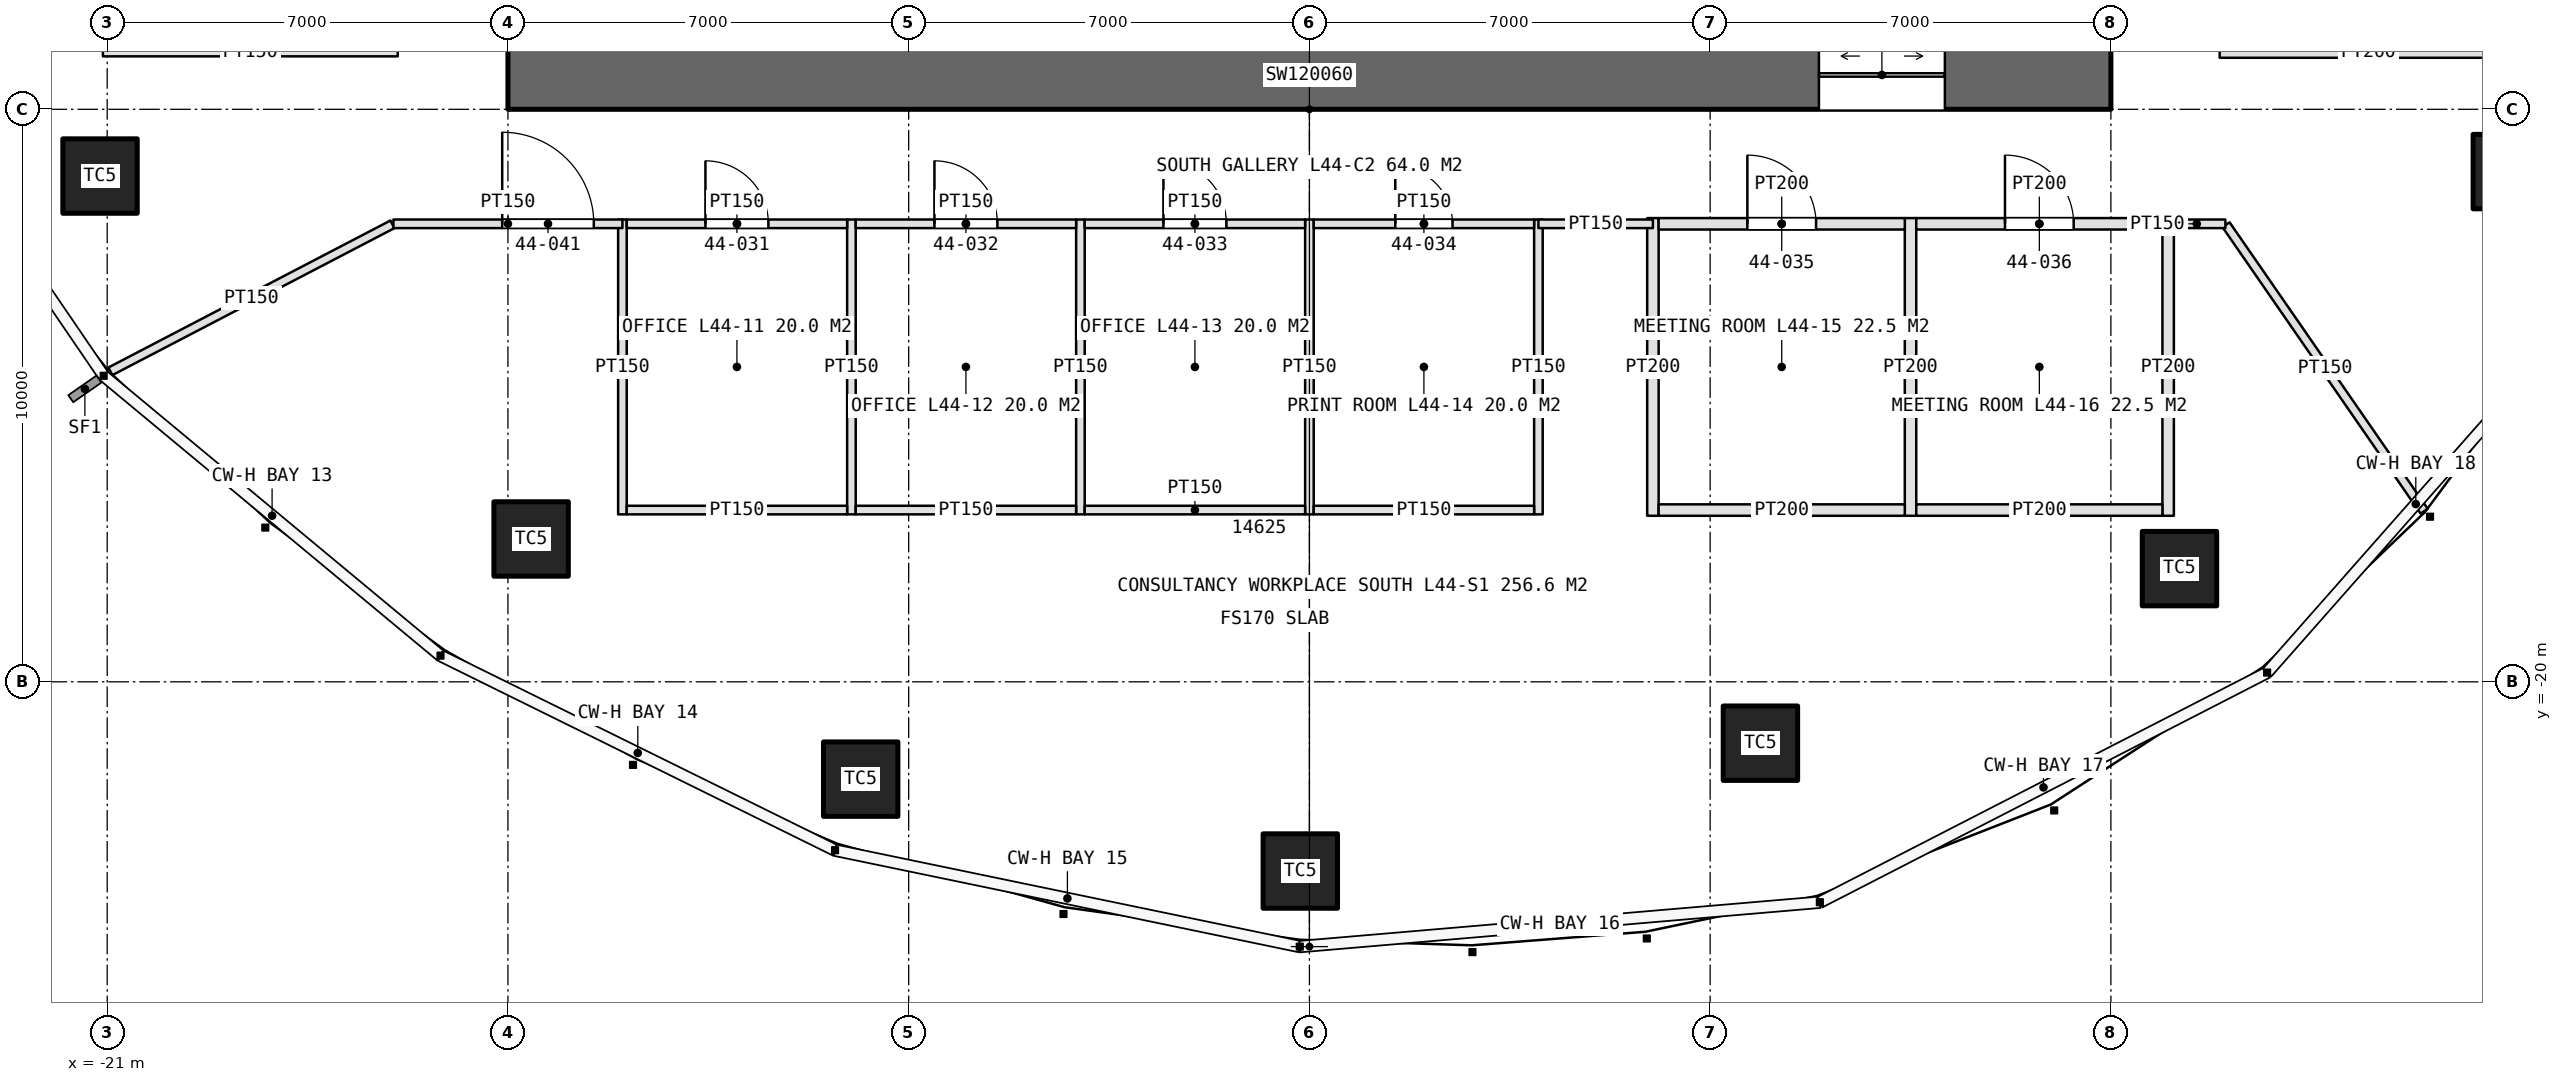
"""IFC4 building model, lengths in metres.
Left out: names, types, materials, properties, quantities, classifications, styles, units other than length and angle.
Written with IfcOpenShell. Run it as: python <this file> out.ifc"""

import sys

from ifc_helpers import new_model, si_unit, direction, frame, frame_2d, origin, origin_2d, place, context, subcontext, project, spatial, rectangle, extrude, element, fill, save


model = new_model("IFC4")
c1 = context("Model", 3, precision=1e-05, world=origin(), true_north=direction((0.0, 1.0)))
c2 = subcontext(c1, "Body", "Model", "MODEL_VIEW")
j1 = project(units=[si_unit("LENGTHUNIT", "METRE"), si_unit("PLANEANGLEUNIT", "RADIAN")], contexts=[c1])
p1 = place(None, origin())
s1 = spatial("IfcSite", under=j1, at=p1, CompositionType="ELEMENT")
p2 = place(p1, origin())
s2 = spatial("IfcBuilding", under=s1, at=p2, CompositionType="ELEMENT")
p3 = place(p2, frame((0.0, 0.0, 203.2)))
s3 = spatial("IfcBuildingStorey", under=s2, at=p3, CompositionType="ELEMENT", Elevation=203.2)
p4 = place(p3, frame((-14.0, -9.4, 0.0), z_axis=(0.0, 0.0, 1.0), x_axis=(1.0, 0.0, 0.0)))
e1 = element("IfcWall", 1, at=p4, inside=s3, PredefinedType="SHEAR", context=c2, shape_type="SweptSolid", body=[
    extrude(rectangle(XDim=28.0, YDim=1.2, at=frame_2d((14.0, 0.0))), origin(), (0.0, 0.0, 1.0), 4.2),
])
p5 = place(p4, frame((22.9, 0.0, 0.0)))
e2 = element("IfcOpeningElement", 2, at=p5, cuts=e1, PredefinedType="OPENING", context=c2, shape_type="SweptSolid", body=[
    extrude(rectangle(XDim=2.2, YDim=2.7, at=frame_2d((1.1, 1.35))), frame((0.0, 0.61, 0.0), z_axis=(0.0, -1.0, 0.0), x_axis=(1.0, 0.0, 0.0)), (0.0, 0.0, 1.0), 1.22),
])
for number, where, z_axis, x_axis in (
    (3, (-21.125, -11.166, 0.0), (0.0, 0.0, 1.0), (1.0, 0.0, 0.0)),
    (4, (-13.595, -17.505, 0.0), (0.0, 0.0, 1.0), (1.0, 0.0, 0.0)),
    (5, (-7.838, -21.7, 0.0), (0.0, 0.0, 1.0), (1.0, 0.0, 0.0)),
    (6, (-0.159, -23.305, 0.0), (0.0, 0.0, 1.0), (1.0, 0.0, 0.0)),
    (7, (7.878, -21.072, 0.0), (0.0, 0.0, 1.0), (1.0, 0.0, 0.0)),
    (8, (15.198, -18.023, 0.0), (0.0, 0.0, 1.0), (1.0, 0.0, 0.0)),
    (9, (20.977, -11.088, 0.0), (0.0, 0.0, 1.0), (1.0, 0.0, 0.0)),
):
    element("IfcColumn", number, at=place(p3, frame(where, z_axis=z_axis, x_axis=x_axis)), inside=s3, PredefinedType="COLUMN", context=c2, shape_type="SweptSolid", body=[
        extrude(rectangle(XDim=1.3, YDim=1.3, at=origin_2d()), origin(), (0.0, 0.0, 1.0), 4.2),
    ])
p6 = place(p3, frame((15.9, -9.0, 0.0), z_axis=(0.0, 0.0, 1.0), x_axis=(1.0, 0.0, 0.0)))
e10 = element("IfcWall", 10, at=p6, inside=s3, PredefinedType="PARTITIONING", context=c2, shape_type="SweptSolid", body=[
    extrude(rectangle(XDim=5.2, YDim=0.2, at=frame_2d((2.6, 0.0))), origin(), (0.0, 0.0, 1.0), 3.0),
])
for number, where, z_axis, x_axis in (
    (11, (-12.0, -11.925, 0.0), (0.0, 0.0, 1.0), (0.0, -1.0, 0.0)),
    (12, (-8.0, -11.925, 0.0), (0.0, 0.0, 1.0), (0.0, -1.0, 0.0)),
    (13, (-4.0, -11.925, 0.0), (0.0, 0.0, 1.0), (0.0, -1.0, 0.0)),
    (14, (0.0, -11.925, 0.0), (0.0, 0.0, 1.0), (0.0, -1.0, 0.0)),
    (15, (4.0, -11.925, 0.0), (0.0, 0.0, 1.0), (0.0, -1.0, 0.0)),
):
    element("IfcWall", number, at=place(p3, frame(where, z_axis=z_axis, x_axis=x_axis)), inside=s3, PredefinedType="PARTITIONING", context=c2, shape_type="SweptSolid", body=[
        extrude(rectangle(XDim=5.15, YDim=0.15, at=frame_2d((2.575, 0.0))), origin(), (0.0, 0.0, 1.0), 3.0),
    ])
p7 = place(p3, frame((-11.925, -12.0, 0.0), z_axis=(0.0, 0.0, 1.0), x_axis=(1.0, 0.0, 0.0)))
e16 = element("IfcWall", 16, at=p7, inside=s3, PredefinedType="PARTITIONING", context=c2, shape_type="SweptSolid", body=[
    extrude(rectangle(XDim=3.85, YDim=0.15, at=frame_2d((1.925, 0.0))), origin(), (0.0, 0.0, 1.0), 3.0),
])
p8 = place(p7, frame((1.375, 0.0, 0.0)))
e17 = element("IfcOpeningElement", 17, at=p8, cuts=e16, PredefinedType="OPENING", context=c2, shape_type="SweptSolid", body=[
    extrude(rectangle(XDim=1.1, YDim=2.3, at=frame_2d((0.55, 1.15))), frame((0.0, 0.085, 0.0), z_axis=(0.0, -1.0, 0.0), x_axis=(1.0, 0.0, 0.0)), (0.0, 0.0, 1.0), 0.17),
])
p9 = place(p3, frame((-11.925, -17.0, 0.0), z_axis=(0.0, 0.0, 1.0), x_axis=(1.0, 0.0, 0.0)))
e18 = element("IfcWall", 18, at=p9, inside=s3, PredefinedType="PARTITIONING", context=c2, shape_type="SweptSolid", body=[
    extrude(rectangle(XDim=3.85, YDim=0.15, at=frame_2d((1.925, 0.0))), origin(), (0.0, 0.0, 1.0), 3.0),
])
p10 = place(p3, frame((-7.925, -12.0, 0.0), z_axis=(0.0, 0.0, 1.0), x_axis=(1.0, 0.0, 0.0)))
e19 = element("IfcWall", 19, at=p10, inside=s3, PredefinedType="PARTITIONING", context=c2, shape_type="SweptSolid", body=[
    extrude(rectangle(XDim=3.85, YDim=0.15, at=frame_2d((1.925, 0.0))), origin(), (0.0, 0.0, 1.0), 3.0),
])
p11 = place(p10, frame((1.375, 0.0, 0.0)))
e20 = element("IfcOpeningElement", 20, at=p11, cuts=e19, PredefinedType="OPENING", context=c2, shape_type="SweptSolid", body=[
    extrude(rectangle(XDim=1.1, YDim=2.3, at=frame_2d((0.55, 1.15))), frame((0.0, 0.085, 0.0), z_axis=(0.0, -1.0, 0.0), x_axis=(1.0, 0.0, 0.0)), (0.0, 0.0, 1.0), 0.17),
])
p12 = place(p3, frame((-7.925, -17.0, 0.0), z_axis=(0.0, 0.0, 1.0), x_axis=(1.0, 0.0, 0.0)))
e21 = element("IfcWall", 21, at=p12, inside=s3, PredefinedType="PARTITIONING", context=c2, shape_type="SweptSolid", body=[
    extrude(rectangle(XDim=3.85, YDim=0.15, at=frame_2d((1.925, 0.0))), origin(), (0.0, 0.0, 1.0), 3.0),
])
p13 = place(p3, frame((-3.925, -12.0, 0.0), z_axis=(0.0, 0.0, 1.0), x_axis=(1.0, 0.0, 0.0)))
e22 = element("IfcWall", 22, at=p13, inside=s3, PredefinedType="PARTITIONING", context=c2, shape_type="SweptSolid", body=[
    extrude(rectangle(XDim=3.85, YDim=0.15, at=frame_2d((1.925, 0.0))), origin(), (0.0, 0.0, 1.0), 3.0),
])
p14 = place(p13, frame((1.375, 0.0, 0.0)))
e23 = element("IfcOpeningElement", 23, at=p14, cuts=e22, PredefinedType="OPENING", context=c2, shape_type="SweptSolid", body=[
    extrude(rectangle(XDim=1.1, YDim=2.3, at=frame_2d((0.55, 1.15))), frame((0.0, 0.085, 0.0), z_axis=(0.0, -1.0, 0.0), x_axis=(1.0, 0.0, 0.0)), (0.0, 0.0, 1.0), 0.17),
])
p15 = place(p3, frame((-3.925, -17.0, 0.0), z_axis=(0.0, 0.0, 1.0), x_axis=(1.0, 0.0, 0.0)))
e24 = element("IfcWall", 24, at=p15, inside=s3, PredefinedType="PARTITIONING", context=c2, shape_type="SweptSolid", body=[
    extrude(rectangle(XDim=3.85, YDim=0.15, at=frame_2d((1.925, 0.0))), origin(), (0.0, 0.0, 1.0), 3.0),
])
p16 = place(p3, frame((0.075, -12.0, 0.0), z_axis=(0.0, 0.0, 1.0), x_axis=(1.0, 0.0, 0.0)))
e25 = element("IfcWall", 25, at=p16, inside=s3, PredefinedType="PARTITIONING", context=c2, shape_type="SweptSolid", body=[
    extrude(rectangle(XDim=3.85, YDim=0.15, at=frame_2d((1.925, 0.0))), origin(), (0.0, 0.0, 1.0), 3.0),
])
p17 = place(p16, frame((1.425, 0.0, 0.0)))
e26 = element("IfcOpeningElement", 26, at=p17, cuts=e25, PredefinedType="OPENING", context=c2, shape_type="SweptSolid", body=[
    extrude(rectangle(XDim=1.0, YDim=2.2, at=frame_2d((0.5, 1.1))), frame((0.0, 0.085, 0.0), z_axis=(0.0, -1.0, 0.0), x_axis=(1.0, 0.0, 0.0)), (0.0, 0.0, 1.0), 0.17),
])
p18 = place(p3, frame((0.075, -17.0, 0.0), z_axis=(0.0, 0.0, 1.0), x_axis=(1.0, 0.0, 0.0)))
e27 = element("IfcWall", 27, at=p18, inside=s3, PredefinedType="PARTITIONING", context=c2, shape_type="SweptSolid", body=[
    extrude(rectangle(XDim=3.85, YDim=0.15, at=frame_2d((1.925, 0.0))), origin(), (0.0, 0.0, 1.0), 3.0),
])
for number, where, z_axis, x_axis in (
    (28, (6.0, -11.9, 0.0), (0.0, 0.0, 1.0), (0.0, -1.0, 0.0)),
    (29, (10.5, -11.9, 0.0), (0.0, 0.0, 1.0), (0.0, -1.0, 0.0)),
    (30, (15.0, -11.9, 0.0), (0.0, 0.0, 1.0), (0.0, -1.0, 0.0)),
):
    element("IfcWall", number, at=place(p3, frame(where, z_axis=z_axis, x_axis=x_axis)), inside=s3, PredefinedType="PARTITIONING", context=c2, shape_type="SweptSolid", body=[
        extrude(rectangle(XDim=5.2, YDim=0.2, at=frame_2d((2.6, 0.0))), origin(), (0.0, 0.0, 1.0), 3.0),
    ])
p19 = place(p3, frame((6.1, -12.0, 0.0), z_axis=(0.0, 0.0, 1.0), x_axis=(1.0, 0.0, 0.0)))
e31 = element("IfcWall", 31, at=p19, inside=s3, PredefinedType="PARTITIONING", context=c2, shape_type="SweptSolid", body=[
    extrude(rectangle(XDim=4.3, YDim=0.2, at=frame_2d((2.15, 0.0))), origin(), (0.0, 0.0, 1.0), 3.0),
])
p20 = place(p19, frame((1.55, 0.0, 0.0)))
e32 = element("IfcOpeningElement", 32, at=p20, cuts=e31, PredefinedType="OPENING", context=c2, shape_type="SweptSolid", body=[
    extrude(rectangle(XDim=1.2, YDim=2.4, at=frame_2d((0.6, 1.2))), frame((0.0, 0.11, 0.0), z_axis=(0.0, -1.0, 0.0), x_axis=(1.0, 0.0, 0.0)), (0.0, 0.0, 1.0), 0.22),
])
p21 = place(p3, frame((6.1, -17.0, 0.0), z_axis=(0.0, 0.0, 1.0), x_axis=(1.0, 0.0, 0.0)))
e33 = element("IfcWall", 33, at=p21, inside=s3, PredefinedType="PARTITIONING", context=c2, shape_type="SweptSolid", body=[
    extrude(rectangle(XDim=4.3, YDim=0.2, at=frame_2d((2.15, 0.0))), origin(), (0.0, 0.0, 1.0), 3.0),
])
p22 = place(p3, frame((10.6, -12.0, 0.0), z_axis=(0.0, 0.0, 1.0), x_axis=(1.0, 0.0, 0.0)))
e34 = element("IfcWall", 34, at=p22, inside=s3, PredefinedType="PARTITIONING", context=c2, shape_type="SweptSolid", body=[
    extrude(rectangle(XDim=4.3, YDim=0.2, at=frame_2d((2.15, 0.0))), origin(), (0.0, 0.0, 1.0), 3.0),
])
p23 = place(p22, frame((1.55, 0.0, 0.0)))
e35 = element("IfcOpeningElement", 35, at=p23, cuts=e34, PredefinedType="OPENING", context=c2, shape_type="SweptSolid", body=[
    extrude(rectangle(XDim=1.2, YDim=2.4, at=frame_2d((0.6, 1.2))), frame((0.0, 0.11, 0.0), z_axis=(0.0, -1.0, 0.0), x_axis=(1.0, 0.0, 0.0)), (0.0, 0.0, 1.0), 0.22),
])
p24 = place(p3, frame((10.6, -17.0, 0.0), z_axis=(0.0, 0.0, 1.0), x_axis=(1.0, 0.0, 0.0)))
e36 = element("IfcWall", 36, at=p24, inside=s3, PredefinedType="PARTITIONING", context=c2, shape_type="SweptSolid", body=[
    extrude(rectangle(XDim=4.3, YDim=0.2, at=frame_2d((2.15, 0.0))), origin(), (0.0, 0.0, 1.0), 3.0),
])
p25 = place(p3, frame((-15.925, -9.0, 0.0), z_axis=(0.0, 0.0, 1.0), x_axis=(-1.0, 0.0, 0.0)))
e37 = element("IfcWall", 37, at=p25, inside=s3, PredefinedType="PARTITIONING", context=c2, shape_type="SweptSolid", body=[
    extrude(rectangle(XDim=5.15, YDim=0.15, at=frame_2d((2.575, 0.0))), origin(), (0.0, 0.0, 1.0), 3.0),
])
p26 = place(p3, frame((-16.018, -12.009, 0.0), z_axis=(0.0, 0.0, 1.0), x_axis=(-0.886831549241, -0.462092851351, 0.0)))
e38 = element("IfcWall", 38, at=p26, inside=s3, PredefinedType="PARTITIONING", context=c2, shape_type="SweptSolid", body=[
    extrude(rectangle(XDim=5.555, YDim=0.15, at=frame_2d((2.778, 0.0))), origin(), (0.0, 0.0, 1.0), 3.0),
])
p27 = place(p3, frame((16.011, -12.016, 0.0), z_axis=(0.0, 0.0, 1.0), x_axis=(0.568863489071, -0.822431961199, 0.0)))
e39 = element("IfcWall", 39, at=p27, inside=s3, PredefinedType="PARTITIONING", context=c2, shape_type="SweptSolid", body=[
    extrude(rectangle(XDim=6.083, YDim=0.15, at=frame_2d((3.042, 0.0))), origin(), (0.0, 0.0, 1.0), 3.0),
])
p28 = place(p3, frame((-16.0, -12.0, 0.0), z_axis=(0.0, 0.0, 1.0), x_axis=(1.0, 0.0, 0.0)))
e40 = element("IfcWall", 40, at=p28, inside=s3, PredefinedType="PARTITIONING", context=c2, shape_type="SweptSolid", body=[
    extrude(rectangle(XDim=4.0, YDim=0.15, at=frame_2d((2.0, 0.0))), origin(), (0.0, 0.0, 1.0), 3.0),
])
p29 = place(p28, frame((1.9, 0.0, 0.0)))
e41 = element("IfcOpeningElement", 41, at=p29, cuts=e40, PredefinedType="OPENING", context=c2, shape_type="SweptSolid", body=[
    extrude(rectangle(XDim=1.6, YDim=2.4, at=frame_2d((0.8, 1.2))), frame((0.0, 0.085, 0.0), z_axis=(0.0, -1.0, 0.0), x_axis=(1.0, 0.0, 0.0)), (0.0, 0.0, 1.0), 0.17),
])
p30 = place(p3, frame((4.0, -12.0, 0.0), z_axis=(0.0, 0.0, 1.0), x_axis=(1.0, 0.0, 0.0)))
e42 = element("IfcWall", 42, at=p30, inside=s3, PredefinedType="PARTITIONING", context=c2, shape_type="SweptSolid", body=[
    extrude(rectangle(XDim=2.0, YDim=0.15, at=frame_2d((1.0, 0.0))), origin(), (0.0, 0.0, 1.0), 3.0),
])
p31 = place(p3, frame((15.0, -12.0, 0.0), z_axis=(0.0, 0.0, 1.0), x_axis=(1.0, 0.0, 0.0)))
e43 = element("IfcWall", 43, at=p31, inside=s3, PredefinedType="PARTITIONING", context=c2, shape_type="SweptSolid", body=[
    extrude(rectangle(XDim=1.0, YDim=0.15, at=frame_2d((0.5, 0.0))), origin(), (0.0, 0.0, 1.0), 3.0),
])
p32 = place(p5, origin())
e44 = element("IfcDoor", 44, at=p32, inside=s3, OperationType="DOUBLE_DOOR_SLIDING", PredefinedType="DOOR", context=c2, shape_type="SweptSolid", body=[
    extrude(rectangle(XDim=2.2, YDim=2.7, at=frame_2d((1.1, 1.35))), frame((0.0, 0.025, 0.0), z_axis=(0.0, -1.0, 0.0), x_axis=(1.0, 0.0, 0.0)), (0.0, 0.0, 1.0), 0.05),
])
fill(e2, e44)
p33 = place(p8, origin())
e45 = element("IfcDoor", 45, at=p33, inside=s3, OperationType="SINGLE_SWING_LEFT", PredefinedType="DOOR", context=c2, shape_type="SweptSolid", body=[
    extrude(rectangle(XDim=1.1, YDim=2.3, at=frame_2d((0.55, 1.15))), frame((0.0, 0.025, 0.0), z_axis=(0.0, -1.0, 0.0), x_axis=(1.0, 0.0, 0.0)), (0.0, 0.0, 1.0), 0.05),
])
fill(e17, e45)
p34 = place(p11, origin())
e46 = element("IfcDoor", 46, at=p34, inside=s3, OperationType="SINGLE_SWING_LEFT", PredefinedType="DOOR", context=c2, shape_type="SweptSolid", body=[
    extrude(rectangle(XDim=1.1, YDim=2.3, at=frame_2d((0.55, 1.15))), frame((0.0, 0.025, 0.0), z_axis=(0.0, -1.0, 0.0), x_axis=(1.0, 0.0, 0.0)), (0.0, 0.0, 1.0), 0.05),
])
fill(e20, e46)
p35 = place(p14, origin())
e47 = element("IfcDoor", 47, at=p35, inside=s3, OperationType="SINGLE_SWING_LEFT", PredefinedType="DOOR", context=c2, shape_type="SweptSolid", body=[
    extrude(rectangle(XDim=1.1, YDim=2.3, at=frame_2d((0.55, 1.15))), frame((0.0, 0.025, 0.0), z_axis=(0.0, -1.0, 0.0), x_axis=(1.0, 0.0, 0.0)), (0.0, 0.0, 1.0), 0.05),
])
fill(e23, e47)
p36 = place(p17, origin())
e48 = element("IfcDoor", 48, at=p36, inside=s3, OperationType="SINGLE_SWING_LEFT", PredefinedType="DOOR", context=c2, shape_type="SweptSolid", body=[
    extrude(rectangle(XDim=1.0, YDim=2.2, at=frame_2d((0.5, 1.1))), frame((0.0, 0.025, 0.0), z_axis=(0.0, -1.0, 0.0), x_axis=(1.0, 0.0, 0.0)), (0.0, 0.0, 1.0), 0.05),
])
fill(e26, e48)
p37 = place(p20, origin())
e49 = element("IfcDoor", 49, at=p37, inside=s3, OperationType="SINGLE_SWING_LEFT", PredefinedType="DOOR", context=c2, shape_type="SweptSolid", body=[
    extrude(rectangle(XDim=1.2, YDim=2.4, at=frame_2d((0.6, 1.2))), frame((0.0, 0.025, 0.0), z_axis=(0.0, -1.0, 0.0), x_axis=(1.0, 0.0, 0.0)), (0.0, 0.0, 1.0), 0.05),
])
fill(e32, e49)
p38 = place(p23, origin())
e50 = element("IfcDoor", 50, at=p38, inside=s3, OperationType="SINGLE_SWING_LEFT", PredefinedType="DOOR", context=c2, shape_type="SweptSolid", body=[
    extrude(rectangle(XDim=1.2, YDim=2.4, at=frame_2d((0.6, 1.2))), frame((0.0, 0.025, 0.0), z_axis=(0.0, -1.0, 0.0), x_axis=(1.0, 0.0, 0.0)), (0.0, 0.0, 1.0), 0.05),
])
fill(e35, e50)
p39 = place(p29, origin())
e51 = element("IfcDoor", 51, at=p39, inside=s3, OperationType="DOUBLE_DOOR_SINGLE_SWING", PredefinedType="DOOR", context=c2, shape_type="SweptSolid", body=[
    extrude(rectangle(XDim=1.6, YDim=2.4, at=frame_2d((0.8, 1.2))), frame((0.0, 0.025, 0.0), z_axis=(0.0, -1.0, 0.0), x_axis=(1.0, 0.0, 0.0)), (0.0, 0.0, 1.0), 0.05),
])
fill(e41, e51)
save(model, sys.argv[1])
